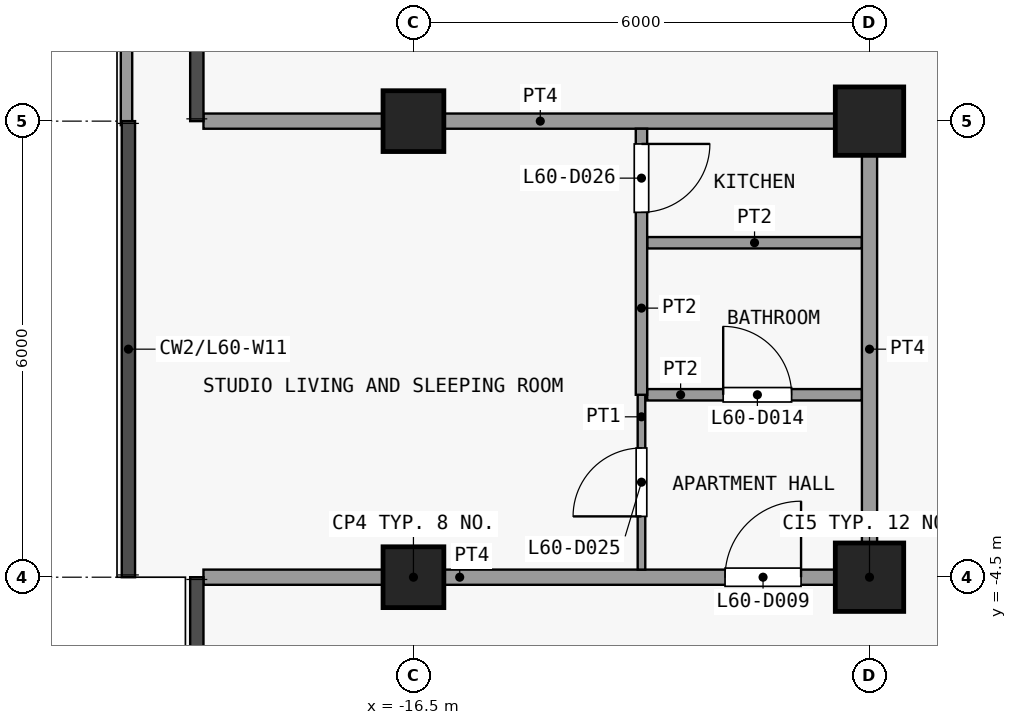
"""IFC4 building model, lengths in metres.
Left out: names, types, materials, properties, quantities, classifications, styles, units other than length and angle.
Written with IfcOpenShell. Run it as: python <this file> out.ifc"""

import sys

from ifc_helpers import new_model, si_unit, direction, frame, frame_2d, origin, origin_2d, place, context, subcontext, project, spatial, rectangle, extrude, element, fill, save


model = new_model("IFC4")
c1 = context("Model", 3, precision=1e-05, world=origin(), true_north=direction((0.0, 1.0)))
c2 = subcontext(c1, "Body", "Model", "MODEL_VIEW")
j1 = project(units=[si_unit("LENGTHUNIT", "METRE"), si_unit("PLANEANGLEUNIT", "RADIAN")], contexts=[c1])
p1 = place(None, origin())
s1 = spatial("IfcSite", under=j1, at=p1, CompositionType="ELEMENT")
p2 = place(p1, origin())
s2 = spatial("IfcBuilding", under=s1, at=p2, CompositionType="ELEMENT")
p3 = place(p2, frame((0.0, 0.0, 237.5)))
s3 = spatial("IfcBuildingStorey", under=s2, at=p3, CompositionType="ELEMENT", Elevation=237.5)
for number, where, z_axis, x_axis in (
    (1, (-16.5, -4.5, 0.0), (0.0, 0.0, 1.0), (1.0, 0.0, 0.0)),
    (2, (-16.5, 1.5, 0.0), (0.0, 0.0, 1.0), (1.0, 0.0, 0.0)),
):
    element("IfcColumn", number, at=place(p3, frame(where, z_axis=z_axis, x_axis=x_axis)), inside=s3, PredefinedType="COLUMN", context=c2, shape_type="SweptSolid", body=[
        extrude(rectangle(XDim=0.8, YDim=0.8, at=origin_2d()), origin(), (0.0, 0.0, 1.0), 3.6),
    ])
for number, where, z_axis, x_axis in (
    (3, (-10.5, -4.5, 0.0), (0.0, 0.0, 1.0), (1.0, 0.0, 0.0)),
    (4, (-10.5, 1.5, 0.0), (0.0, 0.0, 1.0), (1.0, 0.0, 0.0)),
):
    element("IfcColumn", number, at=place(p3, frame(where, z_axis=z_axis, x_axis=x_axis)), inside=s3, PredefinedType="COLUMN", context=c2, shape_type="SweptSolid", body=[
        extrude(rectangle(XDim=0.9, YDim=0.9, at=origin_2d()), origin(), (0.0, 0.0, 1.0), 3.6),
    ])
p4 = place(p3, frame((-20.275, 1.448, 0.0), z_axis=(0.0, 0.0, 1.0), x_axis=(0.0, 1.0, 0.0)))
e5 = element("IfcWall", 5, at=p4, inside=s3, PredefinedType="PARAPET", context=c2, shape_type="SweptSolid", body=[
    extrude(rectangle(XDim=6.002, YDim=0.15, at=frame_2d((3.001, 0.0))), origin(), (0.0, 0.0, 1.0), 1.15),
])
p5 = place(p3, frame((-19.262, -4.5, 0.0), z_axis=(0.0, 0.0, 1.0), x_axis=(1.0, 0.0, 0.0)))
e6 = element("IfcWall", 6, at=p5, inside=s3, PredefinedType="PARTITIONING", context=c2, shape_type="SweptSolid", body=[
    extrude(rectangle(XDim=8.863, YDim=0.2, at=frame_2d((4.431, 0.0))), origin(), (0.0, 0.0, 1.0), 3.3),
])
p6 = place(p5, frame((6.862, 0.0, 0.0)))
e7 = element("IfcOpeningElement", 7, at=p6, cuts=e6, PredefinedType="OPENING", context=c2, shape_type="SweptSolid", body=[
    extrude(rectangle(XDim=1.0, YDim=2.1, at=frame_2d((0.5, 1.05))), frame((0.0, 0.11, 0.0), z_axis=(0.0, -1.0, 0.0), x_axis=(1.0, 0.0, 0.0)), (0.0, 0.0, 1.0), 0.22),
])
p7 = place(p3, frame((-13.425, -2.1, 0.0), z_axis=(0.0, 0.0, 1.0), x_axis=(1.0, 0.0, 0.0)))
e8 = element("IfcWall", 8, at=p7, inside=s3, PredefinedType="PARTITIONING", context=c2, shape_type="SweptSolid", body=[
    extrude(rectangle(XDim=2.825, YDim=0.15, at=frame_2d((1.413, 0.0))), origin(), (0.0, 0.0, 1.0), 3.3),
])
p8 = place(p7, frame((1.0, 0.0, 0.0)))
e9 = element("IfcOpeningElement", 9, at=p8, cuts=e8, PredefinedType="OPENING", context=c2, shape_type="SweptSolid", body=[
    extrude(rectangle(XDim=0.9, YDim=2.1, at=frame_2d((0.45, 1.05))), frame((0.0, 0.085, 0.0), z_axis=(0.0, -1.0, 0.0), x_axis=(1.0, 0.0, 0.0)), (0.0, 0.0, 1.0), 0.17),
])
p9 = place(p3, frame((-13.425, -0.1, 0.0), z_axis=(0.0, 0.0, 1.0), x_axis=(1.0, 0.0, 0.0)))
e10 = element("IfcWall", 10, at=p9, inside=s3, PredefinedType="PARTITIONING", context=c2, shape_type="SweptSolid", body=[
    extrude(rectangle(XDim=2.825, YDim=0.15, at=frame_2d((1.413, 0.0))), origin(), (0.0, 0.0, 1.0), 3.3),
])
p10 = place(p3, frame((-19.262, 1.5, 0.0), z_axis=(0.0, 0.0, 1.0), x_axis=(1.0, 0.0, 0.0)))
e11 = element("IfcWall", 11, at=p10, inside=s3, PredefinedType="PARTITIONING", context=c2, shape_type="SweptSolid", body=[
    extrude(rectangle(XDim=8.863, YDim=0.2, at=frame_2d((4.431, 0.0))), origin(), (0.0, 0.0, 1.0), 3.3),
])
p11 = place(p3, frame((-13.5, -4.4, 0.0), z_axis=(0.0, 0.0, 1.0), x_axis=(0.0, 1.0, 0.0)))
e12 = element("IfcWall", 12, at=p11, inside=s3, PredefinedType="PARTITIONING", context=c2, shape_type="SweptSolid", body=[
    extrude(rectangle(XDim=2.3, YDim=0.1, at=frame_2d((1.15, 0.0))), origin(), (0.0, 0.0, 1.0), 3.3),
])
p12 = place(p11, frame((0.7, 0.0, 0.0)))
e13 = element("IfcOpeningElement", 13, at=p12, cuts=e12, PredefinedType="OPENING", context=c2, shape_type="SweptSolid", body=[
    extrude(rectangle(XDim=0.9, YDim=2.1, at=frame_2d((0.45, 1.05))), frame((0.0, 0.06, 0.0), z_axis=(0.0, -1.0, 0.0), x_axis=(1.0, 0.0, 0.0)), (0.0, 0.0, 1.0), 0.12),
])
p13 = place(p3, frame((-13.5, -2.1, 0.0), z_axis=(0.0, 0.0, 1.0), x_axis=(0.0, 1.0, 0.0)))
e14 = element("IfcWall", 14, at=p13, inside=s3, PredefinedType="PARTITIONING", context=c2, shape_type="SweptSolid", body=[
    extrude(rectangle(XDim=3.5, YDim=0.15, at=frame_2d((1.75, 0.0))), origin(), (0.0, 0.0, 1.0), 3.3),
])
p14 = place(p13, frame((2.4, 0.0, 0.0)))
e15 = element("IfcOpeningElement", 15, at=p14, cuts=e14, PredefinedType="OPENING", context=c2, shape_type="SweptSolid", body=[
    extrude(rectangle(XDim=0.9, YDim=2.1, at=frame_2d((0.45, 1.05))), frame((0.0, 0.085, 0.0), z_axis=(0.0, -1.0, 0.0), x_axis=(1.0, 0.0, 0.0)), (0.0, 0.0, 1.0), 0.17),
])
p15 = place(p3, frame((-10.5, -4.4, 0.0), z_axis=(0.0, 0.0, 1.0), x_axis=(0.0, 1.0, 0.0)))
e16 = element("IfcWall", 16, at=p15, inside=s3, PredefinedType="PARTITIONING", context=c2, shape_type="SweptSolid", body=[
    extrude(rectangle(XDim=5.8, YDim=0.2, at=frame_2d((2.9, 0.0))), origin(), (0.0, 0.0, 1.0), 3.3),
])
p16 = place(p6, origin())
e17 = element("IfcDoor", 17, at=p16, inside=s3, OperationType="SINGLE_SWING_LEFT", PredefinedType="DOOR", context=c2, shape_type="SweptSolid", body=[
    extrude(rectangle(XDim=1.0, YDim=2.1, at=frame_2d((0.5, 1.05))), frame((0.0, 0.025, 0.0), z_axis=(0.0, -1.0, 0.0), x_axis=(1.0, 0.0, 0.0)), (0.0, 0.0, 1.0), 0.05),
])
fill(e7, e17)
p17 = place(p8, origin())
e18 = element("IfcDoor", 18, at=p17, inside=s3, OperationType="SINGLE_SWING_RIGHT", PredefinedType="DOOR", context=c2, shape_type="SweptSolid", body=[
    extrude(rectangle(XDim=0.9, YDim=2.1, at=frame_2d((0.45, 1.05))), frame((0.0, 0.025, 0.0), z_axis=(0.0, -1.0, 0.0), x_axis=(1.0, 0.0, 0.0)), (0.0, 0.0, 1.0), 0.05),
])
fill(e9, e18)
p18 = place(p12, origin())
e19 = element("IfcDoor", 19, at=p18, inside=s3, OperationType="SINGLE_SWING_RIGHT", PredefinedType="DOOR", context=c2, shape_type="SweptSolid", body=[
    extrude(rectangle(XDim=0.9, YDim=2.1, at=frame_2d((0.45, 1.05))), frame((0.0, 0.025, 0.0), z_axis=(0.0, -1.0, 0.0), x_axis=(1.0, 0.0, 0.0)), (0.0, 0.0, 1.0), 0.05),
])
fill(e13, e19)
p19 = place(p14, origin())
e20 = element("IfcDoor", 20, at=p19, inside=s3, OperationType="SINGLE_SWING_RIGHT", PredefinedType="DOOR", context=c2, shape_type="SweptSolid", body=[
    extrude(rectangle(XDim=0.9, YDim=2.1, at=frame_2d((0.45, 1.05))), frame((0.0, 0.025, 0.0), z_axis=(0.0, -1.0, 0.0), x_axis=(1.0, 0.0, 0.0)), (0.0, 0.0, 1.0), 0.05),
])
fill(e15, e20)
save(model, sys.argv[1])
